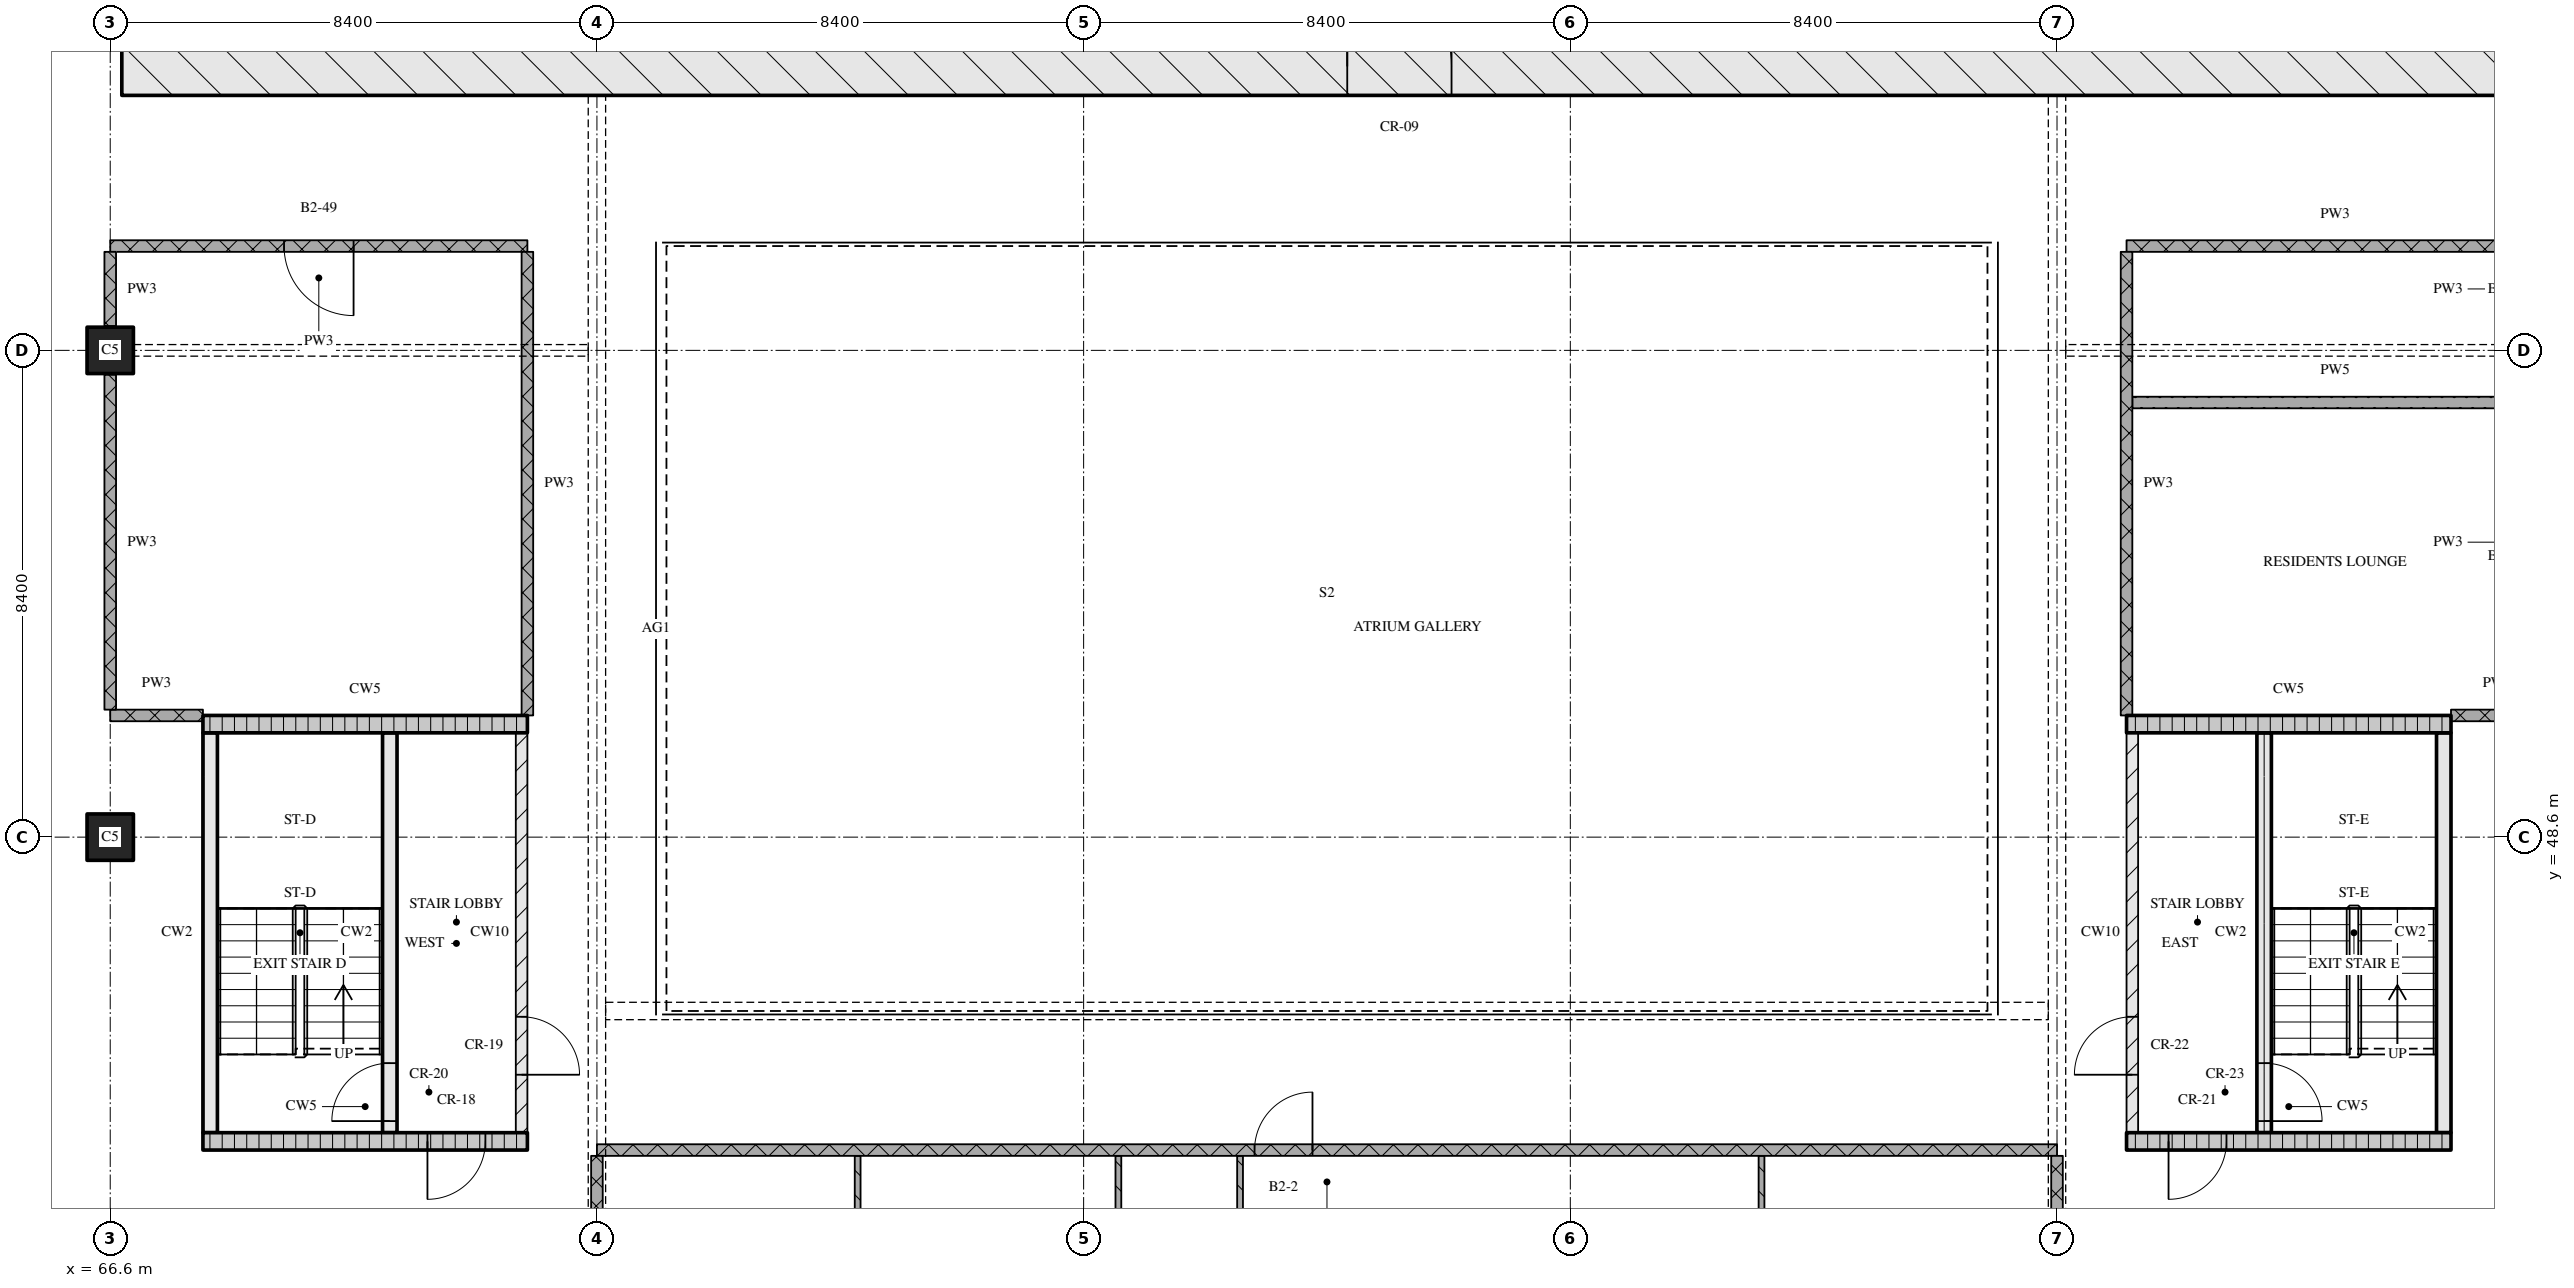
"""IFC4 building model, lengths in metres.
Left out: names, types, materials, properties, quantities, classifications, styles, units other than length and angle.
Written with IfcOpenShell. Run it as: python <this file> out.ifc"""

import sys

from ifc_helpers import new_model, si_unit, direction, frame, frame_2d, origin, origin_2d, place, context, subcontext, project, spatial, rectangle, extrude, element, fill, save


model = new_model("IFC4")
c1 = context("Model", 3, precision=1e-05, world=origin(), true_north=direction((0.0, 1.0)))
c2 = subcontext(c1, "Body", "Model", "MODEL_VIEW")
j1 = project(units=[si_unit("LENGTHUNIT", "METRE"), si_unit("PLANEANGLEUNIT", "RADIAN")], contexts=[c1])
p1 = place(None, origin())
s1 = spatial("IfcSite", under=j1, at=p1, CompositionType="ELEMENT")
p2 = place(p1, origin())
s2 = spatial("IfcBuilding", under=s1, at=p2, CompositionType="ELEMENT")
p3 = place(p2, frame((0.0, 0.0, 109.65)))
s3 = spatial("IfcBuildingStorey", under=s2, at=p3, CompositionType="ELEMENT", Elevation=109.65)
for number, where, z_axis, x_axis in (
    (1, (66.6, 48.6, 0.0), (0.0, 0.0, 1.0), (1.0, 0.0, 0.0)),
    (2, (66.6, 57.0, 0.0), (0.0, 0.0, 1.0), (1.0, 0.0, 0.0)),
):
    element("IfcColumn", number, at=place(p3, frame(where, z_axis=z_axis, x_axis=x_axis)), inside=s3, PredefinedType="COLUMN", context=c2, shape_type="SweptSolid", body=[
        extrude(rectangle(XDim=0.8, YDim=0.8, at=origin_2d()), origin(), (0.0, 0.0, 1.0), 3.6),
    ])
p4 = place(p3, frame((66.8, 61.9, 0.0), z_axis=(0.0, 0.0, 1.0), x_axis=(1.0, 0.0, 0.0)))
e3 = element("IfcWall", 3, at=p4, inside=s3, PredefinedType="SOLIDWALL", context=c2, shape_type="SweptSolid", body=[
    extrude(rectangle(XDim=41.6, YDim=1.0, at=frame_2d((20.8, 0.0))), origin(), (0.0, 0.0, 1.0), 3.32),
])
p5 = place(p4, frame((21.15, 0.0, 0.0)))
e4 = element("IfcOpeningElement", 4, at=p5, cuts=e3, PredefinedType="OPENING", context=c2, shape_type="SweptSolid", body=[
    extrude(rectangle(XDim=1.8, YDim=2.1, at=frame_2d((0.9, 1.05))), frame((0.0, 0.51, 0.0), z_axis=(0.0, -1.0, 0.0), x_axis=(1.0, 0.0, 0.0)), (0.0, 0.0, 1.0), 1.02),
])
p6 = place(p3, frame((68.2, 43.35, 0.0), z_axis=(0.0, 0.0, 1.0), x_axis=(1.0, 0.0, 0.0)))
e5 = element("IfcWall", 5, at=p6, inside=s3, PredefinedType="SOLIDWALL", context=c2, shape_type="SweptSolid", body=[
    extrude(rectangle(XDim=5.6, YDim=0.3, at=frame_2d((2.8, 0.0))), origin(), (0.0, 0.0, 1.0), 3.32),
])
p7 = place(p6, frame((3.875, 0.0, 0.0)))
e6 = element("IfcOpeningElement", 6, at=p7, cuts=e5, PredefinedType="OPENING", context=c2, shape_type="SweptSolid", body=[
    extrude(rectangle(XDim=1.0, YDim=2.1, at=frame_2d((0.5, 1.05))), frame((0.0, 0.16, 0.0), z_axis=(0.0, -1.0, 0.0), x_axis=(1.0, 0.0, 0.0)), (0.0, 0.0, 1.0), 0.32),
])
p8 = place(p3, frame((68.325, 43.5, 0.0), z_axis=(0.0, 0.0, 1.0), x_axis=(0.0, 1.0, 0.0)))
e7 = element("IfcWall", 7, at=p8, inside=s3, PredefinedType="SOLIDWALL", context=c2, shape_type="SweptSolid", body=[
    extrude(rectangle(XDim=6.9, YDim=0.25, at=frame_2d((3.45, 0.0))), origin(), (0.0, 0.0, 1.0), 3.32),
])
p9 = place(p3, frame((71.425, 43.5, 0.0), z_axis=(0.0, 0.0, 1.0), x_axis=(0.0, 1.0, 0.0)))
e8 = element("IfcWall", 8, at=p9, inside=s3, PredefinedType="SOLIDWALL", context=c2, shape_type="SweptSolid", body=[
    extrude(rectangle(XDim=6.9, YDim=0.25, at=frame_2d((3.45, 0.0))), origin(), (0.0, 0.0, 1.0), 3.32),
])
p10 = place(p9, frame((0.2, 0.0, 0.0)))
e9 = element("IfcOpeningElement", 9, at=p10, cuts=e8, PredefinedType="OPENING", context=c2, shape_type="SweptSolid", body=[
    extrude(rectangle(XDim=1.0, YDim=2.1, at=frame_2d((0.5, 1.05))), frame((0.0, 0.135, 0.0), z_axis=(0.0, -1.0, 0.0), x_axis=(1.0, 0.0, 0.0)), (0.0, 0.0, 1.0), 0.27),
])
p11 = place(p3, frame((73.7, 43.5, 0.0), z_axis=(0.0, 0.0, 1.0), x_axis=(0.0, 1.0, 0.0)))
e10 = element("IfcWall", 10, at=p11, inside=s3, PredefinedType="PARTITIONING", context=c2, shape_type="SweptSolid", body=[
    extrude(rectangle(XDim=6.9, YDim=0.2, at=frame_2d((3.45, 0.0))), origin(), (0.0, 0.0, 1.0), 3.32),
])
p12 = place(p11, frame((1.0, 0.0, 0.0)))
e11 = element("IfcOpeningElement", 11, at=p12, cuts=e10, PredefinedType="OPENING", context=c2, shape_type="SweptSolid", body=[
    extrude(rectangle(XDim=1.0, YDim=2.1, at=frame_2d((0.5, 1.05))), frame((0.0, 0.11, 0.0), z_axis=(0.0, -1.0, 0.0), x_axis=(1.0, 0.0, 0.0)), (0.0, 0.0, 1.0), 0.22),
])
p13 = place(p3, frame((68.2, 50.55, 0.0), z_axis=(0.0, 0.0, 1.0), x_axis=(1.0, 0.0, 0.0)))
e12 = element("IfcWall", 12, at=p13, inside=s3, PredefinedType="SOLIDWALL", context=c2, shape_type="SweptSolid", body=[
    extrude(rectangle(XDim=5.6, YDim=0.3, at=frame_2d((2.8, 0.0))), origin(), (0.0, 0.0, 1.0), 3.32),
])
p14 = place(p3, frame((101.4, 43.35, 0.0), z_axis=(0.0, 0.0, 1.0), x_axis=(1.0, 0.0, 0.0)))
e13 = element("IfcWall", 13, at=p14, inside=s3, PredefinedType="SOLIDWALL", context=c2, shape_type="SweptSolid", body=[
    extrude(rectangle(XDim=5.6, YDim=0.3, at=frame_2d((2.8, 0.0))), origin(), (0.0, 0.0, 1.0), 3.32),
])
p15 = place(p14, frame((0.725, 0.0, 0.0)))
e14 = element("IfcOpeningElement", 14, at=p15, cuts=e13, PredefinedType="OPENING", context=c2, shape_type="SweptSolid", body=[
    extrude(rectangle(XDim=1.0, YDim=2.1, at=frame_2d((0.5, 1.05))), frame((0.0, 0.16, 0.0), z_axis=(0.0, -1.0, 0.0), x_axis=(1.0, 0.0, 0.0)), (0.0, 0.0, 1.0), 0.32),
])
p16 = place(p3, frame((101.5, 43.5, 0.0), z_axis=(0.0, 0.0, 1.0), x_axis=(0.0, 1.0, 0.0)))
e15 = element("IfcWall", 15, at=p16, inside=s3, PredefinedType="PARTITIONING", context=c2, shape_type="SweptSolid", body=[
    extrude(rectangle(XDim=6.9, YDim=0.2, at=frame_2d((3.45, 0.0))), origin(), (0.0, 0.0, 1.0), 3.32),
])
p17 = place(p16, frame((1.0, 0.0, 0.0)))
e16 = element("IfcOpeningElement", 16, at=p17, cuts=e15, PredefinedType="OPENING", context=c2, shape_type="SweptSolid", body=[
    extrude(rectangle(XDim=1.0, YDim=2.1, at=frame_2d((0.5, 1.05))), frame((0.0, 0.11, 0.0), z_axis=(0.0, -1.0, 0.0), x_axis=(1.0, 0.0, 0.0)), (0.0, 0.0, 1.0), 0.22),
])
p18 = place(p3, frame((103.775, 43.5, 0.0), z_axis=(0.0, 0.0, 1.0), x_axis=(0.0, 1.0, 0.0)))
e17 = element("IfcWall", 17, at=p18, inside=s3, PredefinedType="SOLIDWALL", context=c2, shape_type="SweptSolid", body=[
    extrude(rectangle(XDim=6.9, YDim=0.25, at=frame_2d((3.45, 0.0))), origin(), (0.0, 0.0, 1.0), 3.32),
])
p19 = place(p18, frame((0.2, 0.0, 0.0)))
e18 = element("IfcOpeningElement", 18, at=p19, cuts=e17, PredefinedType="OPENING", context=c2, shape_type="SweptSolid", body=[
    extrude(rectangle(XDim=1.0, YDim=2.1, at=frame_2d((0.5, 1.05))), frame((0.0, 0.135, 0.0), z_axis=(0.0, -1.0, 0.0), x_axis=(1.0, 0.0, 0.0)), (0.0, 0.0, 1.0), 0.27),
])
p20 = place(p3, frame((106.875, 43.5, 0.0), z_axis=(0.0, 0.0, 1.0), x_axis=(0.0, 1.0, 0.0)))
e19 = element("IfcWall", 19, at=p20, inside=s3, PredefinedType="SOLIDWALL", context=c2, shape_type="SweptSolid", body=[
    extrude(rectangle(XDim=6.9, YDim=0.25, at=frame_2d((3.45, 0.0))), origin(), (0.0, 0.0, 1.0), 3.32),
])
p21 = place(p3, frame((101.4, 50.55, 0.0), z_axis=(0.0, 0.0, 1.0), x_axis=(1.0, 0.0, 0.0)))
e20 = element("IfcWall", 20, at=p21, inside=s3, PredefinedType="SOLIDWALL", context=c2, shape_type="SweptSolid", body=[
    extrude(rectangle(XDim=5.6, YDim=0.3, at=frame_2d((2.8, 0.0))), origin(), (0.0, 0.0, 1.0), 3.32),
])
p22 = place(p3, frame((100.2, 43.2, 0.0), z_axis=(0.0, 0.0, 1.0), x_axis=(-1.0, 0.0, 0.0)))
e21 = element("IfcWall", 21, at=p22, inside=s3, PredefinedType="PARTITIONING", context=c2, shape_type="SweptSolid", body=[
    extrude(rectangle(XDim=25.2, YDim=0.2, at=frame_2d((12.6, 0.0))), origin(), (0.0, 0.0, 1.0), 3.32),
])
p23 = place(p22, frame((12.85, 0.0, 0.0)))
e22 = element("IfcOpeningElement", 22, at=p23, cuts=e21, PredefinedType="OPENING", context=c2, shape_type="SweptSolid", body=[
    extrude(rectangle(XDim=1.0, YDim=2.1, at=frame_2d((0.5, 1.05))), frame((0.0, 0.11, 0.0), z_axis=(0.0, -1.0, 0.0), x_axis=(1.0, 0.0, 0.0)), (0.0, 0.0, 1.0), 0.22),
])
p24 = place(p3, frame((66.6, 50.7, 0.0), z_axis=(0.0, 0.0, 1.0), x_axis=(1.0, 0.0, 0.0)))
e23 = element("IfcWall", 23, at=p24, inside=s3, PredefinedType="PARTITIONING", context=c2, shape_type="SweptSolid", body=[
    extrude(rectangle(XDim=1.6, YDim=0.2, at=frame_2d((0.8, 0.0))), origin(), (0.0, 0.0, 1.0), 3.32),
])
p25 = place(p3, frame((107.0, 50.7, 0.0), z_axis=(0.0, 0.0, 1.0), x_axis=(1.0, 0.0, 0.0)))
e24 = element("IfcWall", 24, at=p25, inside=s3, PredefinedType="PARTITIONING", context=c2, shape_type="SweptSolid", body=[
    extrude(rectangle(XDim=1.6, YDim=0.2, at=frame_2d((0.8, 0.0))), origin(), (0.0, 0.0, 1.0), 3.32),
])
p26 = place(p3, frame((101.5, 56.1, 0.0), z_axis=(0.0, 0.0, 1.0), x_axis=(1.0, 0.0, 0.0)))
e25 = element("IfcWall", 25, at=p26, inside=s3, PredefinedType="PARTITIONING", context=c2, shape_type="SweptSolid", body=[
    extrude(rectangle(XDim=7.0, YDim=0.2, at=frame_2d((3.5, 0.0))), origin(), (0.0, 0.0, 1.0), 3.32),
])
p27 = place(p3, frame((73.8, 58.8, 0.0), z_axis=(0.0, 0.0, 1.0), x_axis=(-1.0, 0.0, 0.0)))
e26 = element("IfcWall", 26, at=p27, inside=s3, PredefinedType="PARTITIONING", context=c2, shape_type="SweptSolid", body=[
    extrude(rectangle(XDim=7.2, YDim=0.2, at=frame_2d((3.6, 0.0))), origin(), (0.0, 0.0, 1.0), 3.32),
])
p28 = place(p27, frame((3.0, 0.0, 0.0)))
e27 = element("IfcOpeningElement", 27, at=p28, cuts=e26, PredefinedType="OPENING", context=c2, shape_type="SweptSolid", body=[
    extrude(rectangle(XDim=1.2, YDim=2.1, at=frame_2d((0.6, 1.05))), frame((0.0, 0.11, 0.0), z_axis=(0.0, -1.0, 0.0), x_axis=(1.0, 0.0, 0.0)), (0.0, 0.0, 1.0), 0.22),
])
p29 = place(p3, frame((101.4, 58.8, 0.0), z_axis=(0.0, 0.0, 1.0), x_axis=(1.0, 0.0, 0.0)))
e28 = element("IfcWall", 28, at=p29, inside=s3, PredefinedType="PARTITIONING", context=c2, shape_type="SweptSolid", body=[
    extrude(rectangle(XDim=7.2, YDim=0.2, at=frame_2d((3.6, 0.0))), origin(), (0.0, 0.0, 1.0), 3.32),
])
p30 = place(p3, frame((66.6, 56.58, 0.0), z_axis=(0.0, 0.0, 1.0), x_axis=(0.0, -1.0, 0.0)))
e29 = element("IfcWall", 29, at=p30, inside=s3, PredefinedType="PARTITIONING", context=c2, shape_type="SweptSolid", body=[
    extrude(rectangle(XDim=5.78, YDim=0.2, at=frame_2d((2.89, 0.0))), origin(), (0.0, 0.0, 1.0), 3.32),
])
p31 = place(p3, frame((66.6, 58.7, 0.0), z_axis=(0.0, 0.0, 1.0), x_axis=(0.0, -1.0, 0.0)))
e30 = element("IfcWall", 30, at=p31, inside=s3, PredefinedType="PARTITIONING", context=c2, shape_type="SweptSolid", body=[
    extrude(rectangle(XDim=1.28, YDim=0.2, at=frame_2d((0.64, 0.0))), origin(), (0.0, 0.0, 1.0), 3.32),
])
p32 = place(p3, frame((73.8, 58.7, 0.0), z_axis=(0.0, 0.0, 1.0), x_axis=(0.0, -1.0, 0.0)))
e31 = element("IfcWall", 31, at=p32, inside=s3, PredefinedType="PARTITIONING", context=c2, shape_type="SweptSolid", body=[
    extrude(rectangle(XDim=8.0, YDim=0.2, at=frame_2d((4.0, 0.0))), origin(), (0.0, 0.0, 1.0), 3.32),
])
p33 = place(p3, frame((75.0, 43.1, 0.0), z_axis=(0.0, 0.0, 1.0), x_axis=(0.0, -1.0, 0.0)))
e32 = element("IfcWall", 32, at=p33, inside=s3, PredefinedType="PARTITIONING", context=c2, shape_type="SweptSolid", body=[
    extrude(rectangle(XDim=2.2, YDim=0.2, at=frame_2d((1.1, 0.0))), origin(), (0.0, 0.0, 1.0), 2.43),
])
for number, where, z_axis, x_axis in (
    (33, (79.5, 43.1, 0.0), (0.0, 0.0, 1.0), (0.0, -1.0, 0.0)),
    (34, (84.0, 43.1, 0.0), (0.0, 0.0, 1.0), (0.0, -1.0, 0.0)),
):
    element("IfcWall", number, at=place(p3, frame(where, z_axis=z_axis, x_axis=x_axis)), inside=s3, PredefinedType="PARTITIONING", context=c2, shape_type="SweptSolid", body=[
        extrude(rectangle(XDim=4.35, YDim=0.1, at=frame_2d((2.175, 0.0))), origin(), (0.0, 0.0, 1.0), 3.32),
    ])
p34 = place(p3, frame((86.1, 38.75, 0.0), z_axis=(0.0, 0.0, 1.0), x_axis=(0.0, 1.0, 0.0)))
e35 = element("IfcWall", 35, at=p34, inside=s3, PredefinedType="PARTITIONING", context=c2, shape_type="SweptSolid", body=[
    extrude(rectangle(XDim=4.35, YDim=0.1, at=frame_2d((2.175, 0.0))), origin(), (0.0, 0.0, 1.0), 3.32),
])
p35 = place(p34, frame((1.75, 0.0, 0.0)))
e36 = element("IfcOpeningElement", 36, at=p35, cuts=e35, PredefinedType="OPENING", context=c2, shape_type="SweptSolid", body=[
    extrude(rectangle(XDim=0.9, YDim=2.1, at=frame_2d((0.45, 1.05))), frame((0.0, 0.06, 0.0), z_axis=(0.0, -1.0, 0.0), x_axis=(1.0, 0.0, 0.0)), (0.0, 0.0, 1.0), 0.12),
])
p36 = place(p3, frame((95.1, 43.1, 0.0), z_axis=(0.0, 0.0, 1.0), x_axis=(0.0, -1.0, 0.0)))
e37 = element("IfcWall", 37, at=p36, inside=s3, PredefinedType="PARTITIONING", context=c2, shape_type="SweptSolid", body=[
    extrude(rectangle(XDim=4.35, YDim=0.1, at=frame_2d((2.175, 0.0))), origin(), (0.0, 0.0, 1.0), 3.32),
])
p37 = place(p3, frame((100.2, 43.1, 0.0), z_axis=(0.0, 0.0, 1.0), x_axis=(0.0, -1.0, 0.0)))
e38 = element("IfcWall", 38, at=p37, inside=s3, PredefinedType="PARTITIONING", context=c2, shape_type="SweptSolid", body=[
    extrude(rectangle(XDim=2.2, YDim=0.2, at=frame_2d((1.1, 0.0))), origin(), (0.0, 0.0, 1.0), 2.43),
])
p38 = place(p3, frame((101.4, 58.7, 0.0), z_axis=(0.0, 0.0, 1.0), x_axis=(0.0, -1.0, 0.0)))
e39 = element("IfcWall", 39, at=p38, inside=s3, PredefinedType="PARTITIONING", context=c2, shape_type="SweptSolid", body=[
    extrude(rectangle(XDim=8.0, YDim=0.2, at=frame_2d((4.0, 0.0))), origin(), (0.0, 0.0, 1.0), 3.32),
])
p39 = place(p5, origin())
e40 = element("IfcDoor", 40, at=p39, inside=s3, OperationType="DOUBLE_DOOR_SINGLE_SWING", PredefinedType="DOOR", context=c2, shape_type="SweptSolid", body=[
    extrude(rectangle(XDim=1.8, YDim=2.1, at=frame_2d((0.9, 1.05))), frame((0.0, 0.025, 0.0), z_axis=(0.0, -1.0, 0.0), x_axis=(1.0, 0.0, 0.0)), (0.0, 0.0, 1.0), 0.05),
])
fill(e4, e40)
p40 = place(p7, origin())
e41 = element("IfcDoor", 41, at=p40, inside=s3, OperationType="SINGLE_SWING_RIGHT", PredefinedType="DOOR", context=c2, shape_type="SweptSolid", body=[
    extrude(rectangle(XDim=1.0, YDim=2.1, at=frame_2d((0.5, 1.05))), frame((0.0, 0.025, 0.0), z_axis=(0.0, -1.0, 0.0), x_axis=(1.0, 0.0, 0.0)), (0.0, 0.0, 1.0), 0.05),
])
fill(e6, e41)
p41 = place(p10, origin())
e42 = element("IfcDoor", 42, at=p41, inside=s3, OperationType="SINGLE_SWING_LEFT", PredefinedType="DOOR", context=c2, shape_type="SweptSolid", body=[
    extrude(rectangle(XDim=1.0, YDim=2.1, at=frame_2d((0.5, 1.05))), frame((0.0, 0.025, 0.0), z_axis=(0.0, -1.0, 0.0), x_axis=(1.0, 0.0, 0.0)), (0.0, 0.0, 1.0), 0.05),
])
fill(e9, e42)
p42 = place(p12, origin())
e43 = element("IfcDoor", 43, at=p42, inside=s3, OperationType="SINGLE_SWING_RIGHT", PredefinedType="DOOR", context=c2, shape_type="SweptSolid", body=[
    extrude(rectangle(XDim=1.0, YDim=2.1, at=frame_2d((0.5, 1.05))), frame((0.0, 0.025, 0.0), z_axis=(0.0, -1.0, 0.0), x_axis=(1.0, 0.0, 0.0)), (0.0, 0.0, 1.0), 0.05),
])
fill(e11, e43)
p43 = place(p15, origin())
e44 = element("IfcDoor", 44, at=p43, inside=s3, OperationType="SINGLE_SWING_RIGHT", PredefinedType="DOOR", context=c2, shape_type="SweptSolid", body=[
    extrude(rectangle(XDim=1.0, YDim=2.1, at=frame_2d((0.5, 1.05))), frame((0.0, 0.025, 0.0), z_axis=(0.0, -1.0, 0.0), x_axis=(1.0, 0.0, 0.0)), (0.0, 0.0, 1.0), 0.05),
])
fill(e14, e44)
p44 = place(p19, origin())
e45 = element("IfcDoor", 45, at=p44, inside=s3, OperationType="SINGLE_SWING_RIGHT", PredefinedType="DOOR", context=c2, shape_type="SweptSolid", body=[
    extrude(rectangle(XDim=1.0, YDim=2.1, at=frame_2d((0.5, 1.05))), frame((0.0, 0.025, 0.0), z_axis=(0.0, -1.0, 0.0), x_axis=(1.0, 0.0, 0.0)), (0.0, 0.0, 1.0), 0.05),
])
fill(e18, e45)
p45 = place(p17, origin())
e46 = element("IfcDoor", 46, at=p45, inside=s3, OperationType="SINGLE_SWING_LEFT", PredefinedType="DOOR", context=c2, shape_type="SweptSolid", body=[
    extrude(rectangle(XDim=1.0, YDim=2.1, at=frame_2d((0.5, 1.05))), frame((0.0, 0.025, 0.0), z_axis=(0.0, -1.0, 0.0), x_axis=(1.0, 0.0, 0.0)), (0.0, 0.0, 1.0), 0.05),
])
fill(e16, e46)
p46 = place(p23, origin())
e47 = element("IfcDoor", 47, at=p46, inside=s3, OperationType="SINGLE_SWING_RIGHT", PredefinedType="DOOR", context=c2, shape_type="SweptSolid", body=[
    extrude(rectangle(XDim=1.0, YDim=2.1, at=frame_2d((0.5, 1.05))), frame((0.0, 0.025, 0.0), z_axis=(0.0, -1.0, 0.0), x_axis=(1.0, 0.0, 0.0)), (0.0, 0.0, 1.0), 0.05),
])
fill(e22, e47)
p47 = place(p28, origin())
e48 = element("IfcDoor", 48, at=p47, inside=s3, OperationType="SINGLE_SWING_LEFT", PredefinedType="DOOR", context=c2, shape_type="SweptSolid", body=[
    extrude(rectangle(XDim=1.2, YDim=2.1, at=frame_2d((0.6, 1.05))), frame((0.0, 0.025, 0.0), z_axis=(0.0, -1.0, 0.0), x_axis=(1.0, 0.0, 0.0)), (0.0, 0.0, 1.0), 0.05),
])
fill(e27, e48)
save(model, sys.argv[1])
